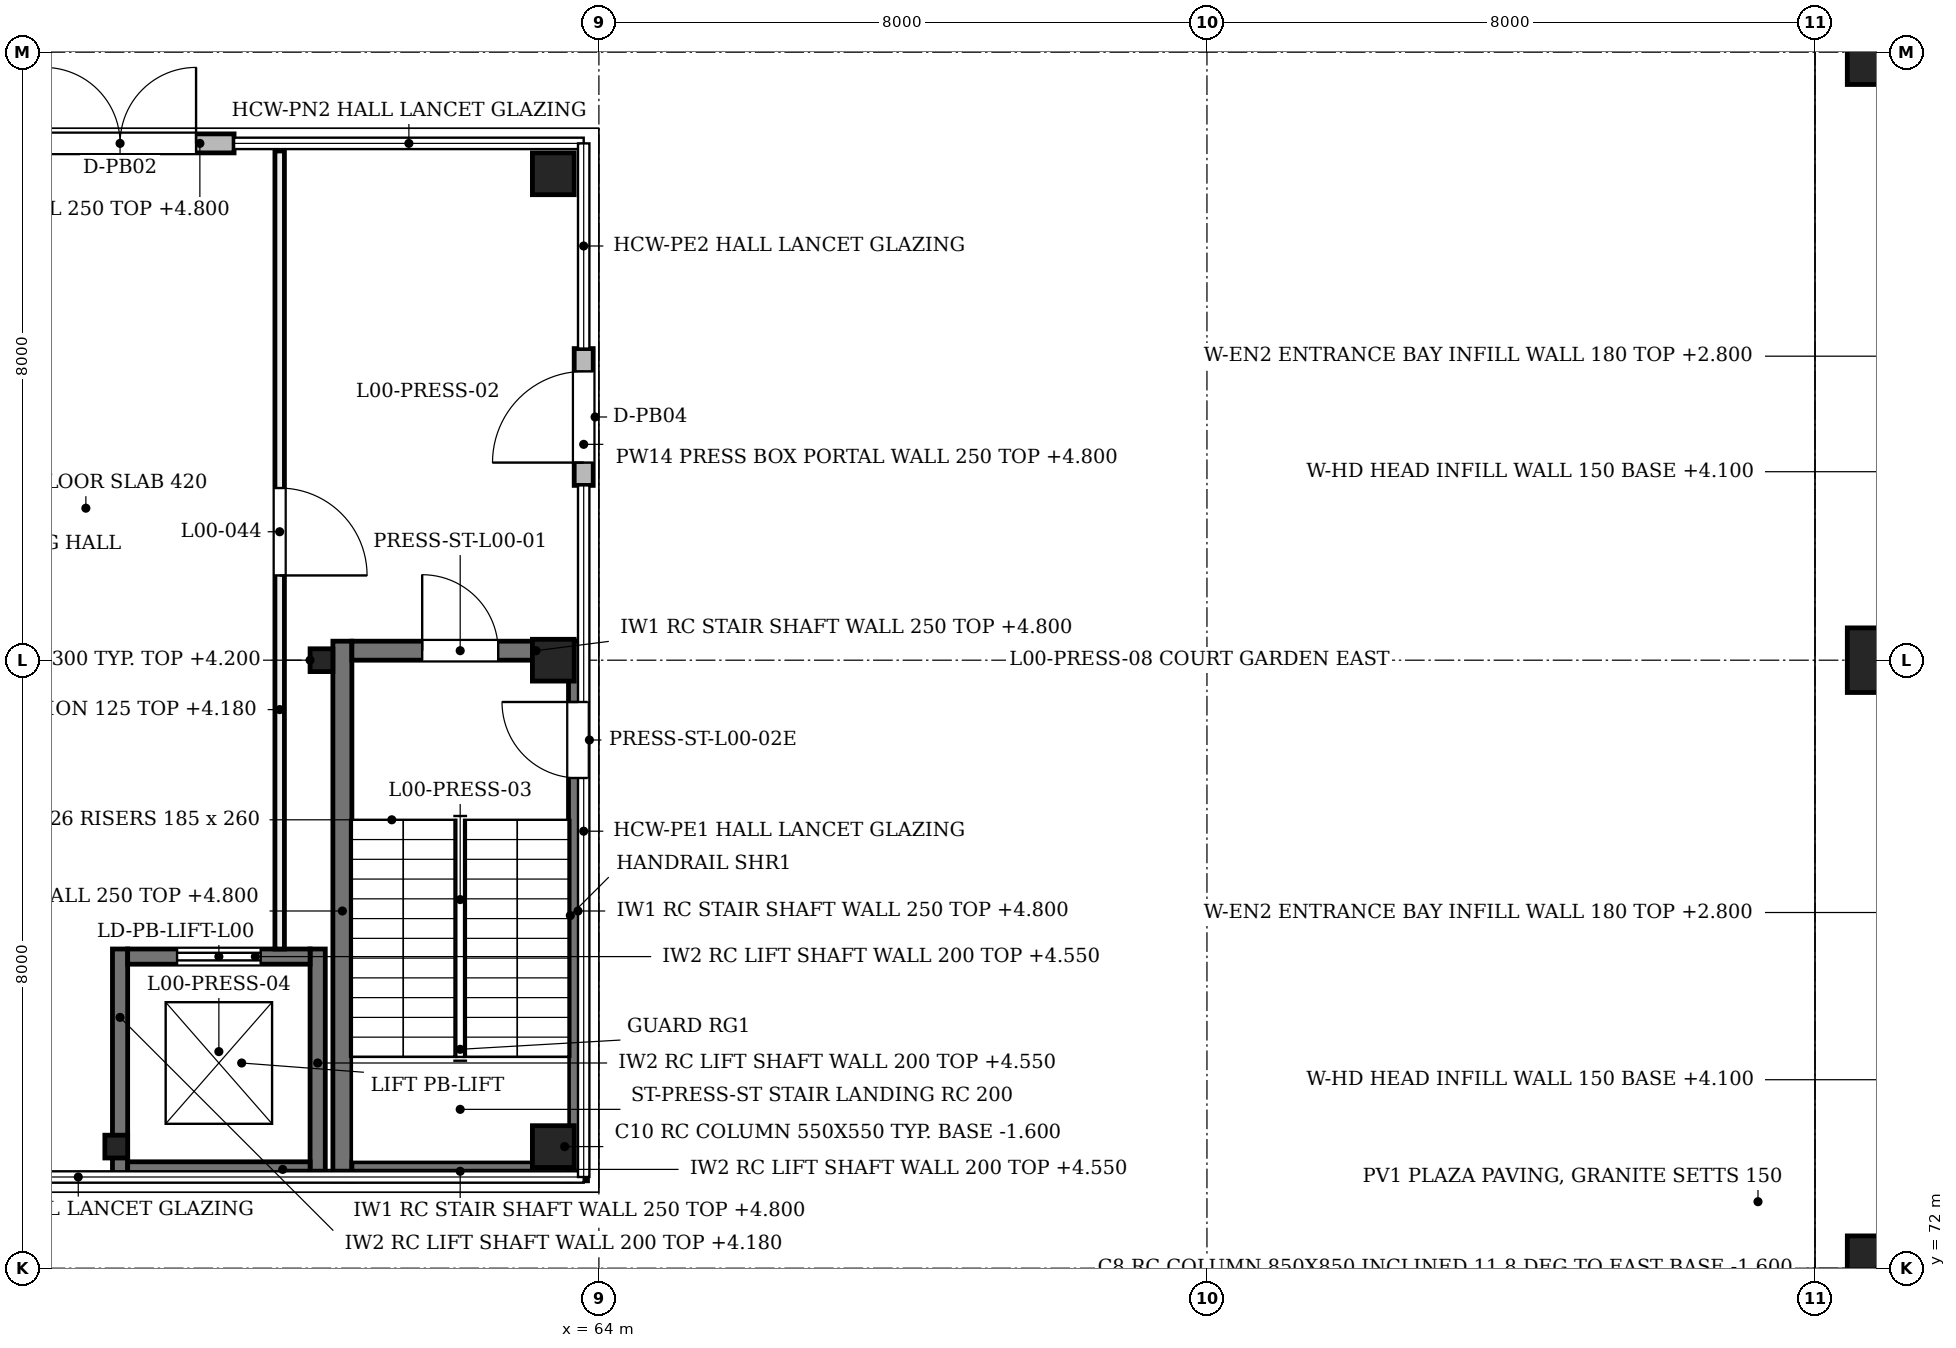
"""IFC4 building model, lengths in metres.
Left out: names, types, materials, properties, quantities, classifications, styles, units other than length and angle.
Written with IfcOpenShell. Run it as: python <this file> out.ifc"""

import sys

from ifc_helpers import new_model, si_unit, direction, frame, frame_2d, origin, origin_2d, place, context, subcontext, project, spatial, rectangle, extrude, element, fill, save


model = new_model("IFC4")
c1 = context("Model", 3, precision=1e-05, world=origin(), true_north=direction((0.0, 1.0)))
c2 = subcontext(c1, "Body", "Model", "MODEL_VIEW")
j1 = project(units=[si_unit("LENGTHUNIT", "METRE"), si_unit("PLANEANGLEUNIT", "RADIAN")], contexts=[c1])
p1 = place(None, origin())
s1 = spatial("IfcSite", under=j1, at=p1, CompositionType="ELEMENT")
p2 = place(p1, origin())
s2 = spatial("IfcBuilding", under=s1, at=p2, CompositionType="ELEMENT")
p3 = place(p2, origin())
s3 = spatial("IfcBuildingStorey", under=s2, at=p3, CompositionType="ELEMENT", Elevation=0.0)
for number, where, z_axis, x_axis in (
    (1, (80.267, 72.0, -1.6), (0.204, 0.0, 0.979), (0.0, 1.0, 0.0)),
    (2, (80.267, 80.0, -1.6), (0.204, 0.0, 0.979), (0.0, 1.0, 0.0)),
    (3, (80.267, 88.0, -1.6), (0.204, 0.0, 0.979), (0.0, 1.0, 0.0)),
):
    element("IfcColumn", number, at=place(p3, frame(where, z_axis=z_axis, x_axis=x_axis)), inside=s3, PredefinedType="COLUMN", context=c2, shape_type="SweptSolid", body=[
        extrude(rectangle(XDim=0.85, YDim=0.85, at=origin_2d()), origin(), (0.0, 0.0, 1.0), 6.538),
    ])
for number, where, z_axis, x_axis in (
    (4, (63.4, 73.6, -1.6), (0.0, 0.0, 1.0), (1.0, 0.0, 0.0)),
    (5, (63.4, 80.0, -1.6), (0.0, 0.0, 1.0), (1.0, 0.0, 0.0)),
    (6, (63.4, 86.4, -1.6), (0.0, 0.0, 1.0), (1.0, 0.0, 0.0)),
):
    element("IfcColumn", number, at=place(p3, frame(where, z_axis=z_axis, x_axis=x_axis)), inside=s3, PredefinedType="COLUMN", context=c2, shape_type="SweptSolid", body=[
        extrude(rectangle(XDim=0.55, YDim=0.55, at=origin_2d()), origin(), (0.0, 0.0, 1.0), 6.4),
    ])
for number, where, z_axis, x_axis in (
    (7, (57.65, 73.6, 0.0), (0.0, 0.0, 1.0), (1.0, 0.0, 0.0)),
    (8, (60.35, 80.0, 0.0), (0.0, 0.0, 1.0), (1.0, 0.0, 0.0)),
):
    element("IfcColumn", number, at=place(p3, frame(where, z_axis=z_axis, x_axis=x_axis)), inside=s3, PredefinedType="COLUMN", context=c2, shape_type="SweptSolid", body=[
        extrude(rectangle(XDim=0.3, YDim=0.3, at=origin_2d()), origin(), (0.0, 0.0, 1.0), 4.2),
    ])
p4 = place(p3, frame((56.2, 86.8, 0.0), z_axis=(0.0, 0.0, 1.0), x_axis=(1.0, 0.0, 0.0)))
e9 = element("IfcWall", 9, at=p4, inside=s3, PredefinedType="SOLIDWALL", context=c2, shape_type="SweptSolid", body=[
    extrude(rectangle(XDim=3.0, YDim=0.25, at=frame_2d((1.5, 0.0))), origin(), (0.0, 0.0, 1.0), 4.8),
])
p5 = place(p4, frame((0.5, 0.0, 0.0)))
e10 = element("IfcOpeningElement", 10, at=p5, cuts=e9, PredefinedType="OPENING", context=c2, shape_type="SweptSolid", body=[
    extrude(rectangle(XDim=2.0, YDim=2.4, at=frame_2d((1.0, 1.2))), frame((0.0, 0.135, 0.0), z_axis=(0.0, -1.0, 0.0), x_axis=(1.0, 0.0, 0.0)), (0.0, 0.0, 1.0), 0.27),
])
p6 = place(p3, frame((63.8, 82.3, 0.0), z_axis=(0.0, 0.0, 1.0), x_axis=(0.0, 1.0, 0.0)))
e11 = element("IfcWall", 11, at=p6, inside=s3, PredefinedType="SOLIDWALL", context=c2, shape_type="SweptSolid", body=[
    extrude(rectangle(XDim=1.8, YDim=0.25, at=frame_2d((0.9, 0.0))), origin(), (0.0, 0.0, 1.0), 4.8),
])
p7 = place(p6, frame((0.3, 0.0, 0.0)))
e12 = element("IfcOpeningElement", 12, at=p7, cuts=e11, PredefinedType="OPENING", context=c2, shape_type="SweptSolid", body=[
    extrude(rectangle(XDim=1.2, YDim=2.4, at=frame_2d((0.6, 1.2))), frame((0.0, 0.135, 0.0), z_axis=(0.0, -1.0, 0.0), x_axis=(1.0, 0.0, 0.0)), (0.0, 0.0, 1.0), 0.27),
])
p8 = place(p3, frame((60.625, 73.15, 0.0), z_axis=(0.0, 0.0, 1.0), x_axis=(0.0, 1.0, 0.0)))
e13 = element("IfcWall", 13, at=p8, inside=s3, PredefinedType="SOLIDWALL", context=c2, shape_type="SweptSolid", body=[
    extrude(rectangle(XDim=7.1, YDim=0.25, at=frame_2d((3.55, 0.0))), origin(), (0.0, 0.0, 1.0), 4.8),
])
p9 = place(p3, frame((63.725, 73.15, 0.0), z_axis=(0.0, 0.0, 1.0), x_axis=(0.0, 1.0, 0.0)))
e14 = element("IfcWall", 14, at=p9, inside=s3, PredefinedType="SOLIDWALL", context=c2, shape_type="SweptSolid", body=[
    extrude(rectangle(XDim=7.1, YDim=0.25, at=frame_2d((3.55, 0.0))), origin(), (0.0, 0.0, 1.0), 4.8),
])
p10 = place(p9, frame((5.3, 0.0, 0.0)))
e15 = element("IfcOpeningElement", 15, at=p10, cuts=e14, PredefinedType="OPENING", context=c2, shape_type="SweptSolid", body=[
    extrude(rectangle(XDim=1.0, YDim=2.1, at=frame_2d((0.5, 1.05))), frame((0.0, 0.135, 0.0), z_axis=(0.0, -1.0, 0.0), x_axis=(1.0, 0.0, 0.0)), (0.0, 0.0, 1.0), 0.27),
])
p11 = place(p3, frame((60.75, 73.275, 0.0), z_axis=(0.0, 0.0, 1.0), x_axis=(1.0, 0.0, 0.0)))
e16 = element("IfcWall", 16, at=p11, inside=s3, PredefinedType="SOLIDWALL", context=c2, shape_type="SweptSolid", body=[
    extrude(rectangle(XDim=2.85, YDim=0.25, at=frame_2d((1.425, 0.0))), origin(), (0.0, 0.0, 1.0), 4.8),
])
p12 = place(p3, frame((60.75, 80.125, 0.0), z_axis=(0.0, 0.0, 1.0), x_axis=(1.0, 0.0, 0.0)))
e17 = element("IfcWall", 17, at=p12, inside=s3, PredefinedType="SOLIDWALL", context=c2, shape_type="SweptSolid", body=[
    extrude(rectangle(XDim=2.85, YDim=0.25, at=frame_2d((1.425, 0.0))), origin(), (0.0, 0.0, 1.0), 4.8),
])
p13 = place(p12, frame((0.925, 0.0, 0.0)))
e18 = element("IfcOpeningElement", 18, at=p13, cuts=e17, PredefinedType="OPENING", context=c2, shape_type="SweptSolid", body=[
    extrude(rectangle(XDim=1.0, YDim=2.1, at=frame_2d((0.5, 1.05))), frame((0.0, 0.135, 0.0), z_axis=(0.0, -1.0, 0.0), x_axis=(1.0, 0.0, 0.0)), (0.0, 0.0, 1.0), 0.27),
])
p14 = place(p3, frame((57.7, 73.2, 0.0), z_axis=(0.0, 0.0, 1.0), x_axis=(0.0, 1.0, 0.0)))
e19 = element("IfcWall", 19, at=p14, inside=s3, PredefinedType="SOLIDWALL", context=c2, shape_type="SweptSolid", body=[
    extrude(rectangle(XDim=3.0, YDim=0.2, at=frame_2d((1.5, 0.0))), origin(), (0.0, 0.0, 1.0), 4.18),
])
p15 = place(p3, frame((60.3, 73.2, 0.0), z_axis=(0.0, 0.0, 1.0), x_axis=(0.0, 1.0, 0.0)))
e20 = element("IfcWall", 20, at=p15, inside=s3, PredefinedType="SOLIDWALL", context=c2, shape_type="SweptSolid", body=[
    extrude(rectangle(XDim=3.0, YDim=0.2, at=frame_2d((1.5, 0.0))), origin(), (0.0, 0.0, 1.0), 4.55),
])
p16 = place(p3, frame((57.8, 73.3, 0.0), z_axis=(0.0, 0.0, 1.0), x_axis=(1.0, 0.0, 0.0)))
e21 = element("IfcWall", 21, at=p16, inside=s3, PredefinedType="SOLIDWALL", context=c2, shape_type="SweptSolid", body=[
    extrude(rectangle(XDim=2.4, YDim=0.2, at=frame_2d((1.2, 0.0))), origin(), (0.0, 0.0, 1.0), 4.55),
])
p17 = place(p3, frame((57.8, 76.1, 0.0), z_axis=(0.0, 0.0, 1.0), x_axis=(1.0, 0.0, 0.0)))
e22 = element("IfcWall", 22, at=p17, inside=s3, PredefinedType="SOLIDWALL", context=c2, shape_type="SweptSolid", body=[
    extrude(rectangle(XDim=2.4, YDim=0.2, at=frame_2d((1.2, 0.0))), origin(), (0.0, 0.0, 1.0), 4.55),
])
p18 = place(p17, frame((0.65, 0.0, 0.0)))
e23 = element("IfcOpeningElement", 23, at=p18, cuts=e22, PredefinedType="OPENING", context=c2, shape_type="SweptSolid", body=[
    extrude(rectangle(XDim=1.1, YDim=2.1, at=frame_2d((0.55, 1.05))), frame((0.0, 0.11, 0.0), z_axis=(0.0, -1.0, 0.0), x_axis=(1.0, 0.0, 0.0)), (0.0, 0.0, 1.0), 0.22),
])
p19 = place(p3, frame((59.8, 76.2, 0.0), z_axis=(0.0, 0.0, 1.0), x_axis=(0.0, 1.0, 0.0)))
e24 = element("IfcWall", 24, at=p19, inside=s3, PredefinedType="PARTITIONING", context=c2, shape_type="SweptSolid", body=[
    extrude(rectangle(XDim=10.5, YDim=0.125, at=frame_2d((5.25, 0.0))), origin(), (0.0, 0.0, 1.0), 4.18),
])
p20 = place(p19, frame((4.915, 0.0, 0.0)))
e25 = element("IfcOpeningElement", 25, at=p20, cuts=e24, PredefinedType="OPENING", context=c2, shape_type="SweptSolid", body=[
    extrude(rectangle(XDim=1.15, YDim=2.1, at=frame_2d((0.575, 1.05))), frame((0.0, 0.073, 0.0), z_axis=(0.0, -1.0, 0.0), x_axis=(1.0, 0.0, 0.0)), (0.0, 0.0, 1.0), 0.145),
])
p21 = place(p5, origin())
e26 = element("IfcDoor", 26, at=p21, inside=s3, OperationType="SINGLE_SWING_LEFT", PredefinedType="DOOR", context=c2, shape_type="SweptSolid", body=[
    extrude(rectangle(XDim=2.0, YDim=2.4, at=frame_2d((1.0, 1.2))), frame((0.0, 0.025, 0.0), z_axis=(0.0, -1.0, 0.0), x_axis=(1.0, 0.0, 0.0)), (0.0, 0.0, 1.0), 0.05),
])
fill(e10, e26)
p22 = place(p7, origin())
e27 = element("IfcDoor", 27, at=p22, inside=s3, OperationType="SINGLE_SWING_LEFT", PredefinedType="DOOR", context=c2, shape_type="SweptSolid", body=[
    extrude(rectangle(XDim=1.2, YDim=2.4, at=frame_2d((0.6, 1.2))), frame((0.0, 0.025, 0.0), z_axis=(0.0, -1.0, 0.0), x_axis=(1.0, 0.0, 0.0)), (0.0, 0.0, 1.0), 0.05),
])
fill(e12, e27)
p23 = place(p13, origin())
e28 = element("IfcDoor", 28, at=p23, inside=s3, OperationType="SINGLE_SWING_LEFT", PredefinedType="DOOR", context=c2, shape_type="SweptSolid", body=[
    extrude(rectangle(XDim=1.0, YDim=2.1, at=frame_2d((0.5, 1.05))), frame((0.0, 0.025, 0.0), z_axis=(0.0, -1.0, 0.0), x_axis=(1.0, 0.0, 0.0)), (0.0, 0.0, 1.0), 0.05),
])
fill(e18, e28)
p24 = place(p10, frame((1.0, 0.0, 0.0), z_axis=(0.0, 0.0, 1.0), x_axis=(-1.0, 0.0, 0.0)))
e29 = element("IfcDoor", 29, at=p24, inside=s3, OperationType="SINGLE_SWING_RIGHT", PredefinedType="DOOR", context=c2, shape_type="SweptSolid", body=[
    extrude(rectangle(XDim=1.0, YDim=2.1, at=frame_2d((0.5, 1.05))), frame((0.0, 0.025, 0.0), z_axis=(0.0, -1.0, 0.0), x_axis=(1.0, 0.0, 0.0)), (0.0, 0.0, 1.0), 0.05),
])
fill(e15, e29)
p25 = place(p18, origin())
e30 = element("IfcDoor", 30, at=p25, inside=s3, OperationType="DOUBLE_DOOR_SLIDING", PredefinedType="DOOR", context=c2, shape_type="SweptSolid", body=[
    extrude(rectangle(XDim=1.1, YDim=2.1, at=frame_2d((0.55, 1.05))), frame((0.0, 0.025, 0.0), z_axis=(0.0, -1.0, 0.0), x_axis=(1.0, 0.0, 0.0)), (0.0, 0.0, 1.0), 0.05),
])
fill(e23, e30)
p26 = place(p20, frame((1.15, 0.0, 0.0), z_axis=(0.0, 0.0, 1.0), x_axis=(-1.0, 0.0, 0.0)))
e31 = element("IfcDoor", 31, at=p26, inside=s3, OperationType="SINGLE_SWING_LEFT", PredefinedType="DOOR", context=c2, shape_type="SweptSolid", body=[
    extrude(rectangle(XDim=1.15, YDim=2.1, at=frame_2d((0.575, 1.05))), frame((0.0, 0.025, 0.0), z_axis=(0.0, -1.0, 0.0), x_axis=(1.0, 0.0, 0.0)), (0.0, 0.0, 1.0), 0.05),
])
fill(e25, e31)
save(model, sys.argv[1])
